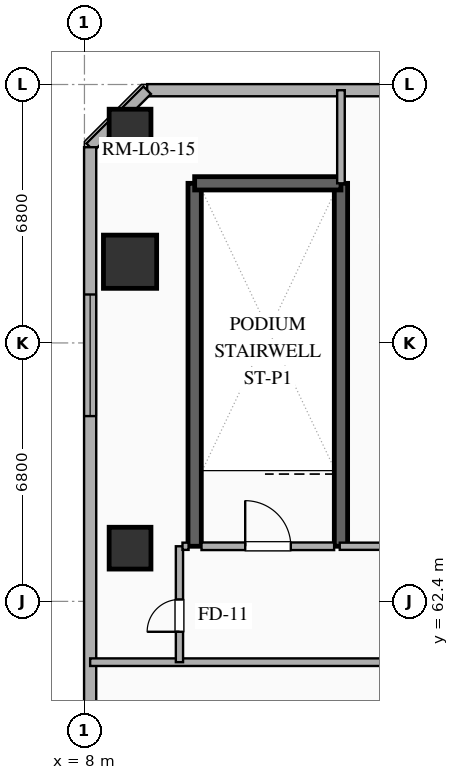
"""IFC4 building model, lengths in metres.
Left out: names, types, materials, properties, quantities, classifications, styles, units other than length and angle.
Written with IfcOpenShell. Run it as: python <this file> out.ifc"""

import sys

from ifc_helpers import new_model, si_unit, direction, frame, frame_2d, origin, origin_2d, place, context, subcontext, project, spatial, rectangle, extrude, element, fill, save


model = new_model("IFC4")
c1 = context("Model", 3, precision=1e-05, world=origin(), true_north=direction((0.0, 1.0)))
c2 = subcontext(c1, "Body", "Model", "MODEL_VIEW")
j1 = project(units=[si_unit("LENGTHUNIT", "METRE"), si_unit("PLANEANGLEUNIT", "RADIAN")], contexts=[c1])
p1 = place(None, origin())
s1 = spatial("IfcSite", under=j1, at=p1, CompositionType="ELEMENT")
p2 = place(p1, origin())
s2 = spatial("IfcBuilding", under=s1, at=p2, CompositionType="ELEMENT")
p3 = place(p2, frame((0.0, 0.0, 16.8)))
s3 = spatial("IfcBuildingStorey", under=s2, at=p3, CompositionType="ELEMENT", Elevation=16.8)
for number, where, z_axis, x_axis in (
    (1, (9.2, 74.8, 0.0), (0.0, 0.0, 1.0), (1.0, 0.0, 0.0)),
    (2, (9.2, 63.8, 0.0), (0.0, 0.0, 1.0), (1.0, 0.0, 0.0)),
):
    element("IfcColumn", number, at=place(p3, frame(where, z_axis=z_axis, x_axis=x_axis)), inside=s3, PredefinedType="COLUMN", context=c2, shape_type="SweptSolid", body=[
        extrude(rectangle(XDim=1.1, YDim=1.1, at=origin_2d()), origin(), (0.0, 0.0, 1.0), 5.05),
    ])
p4 = place(p3, frame((9.2, 71.337, 0.0), z_axis=(0.0, 0.0, 1.0), x_axis=(1.0, 0.0, 0.0)))
e3 = element("IfcColumn", 3, at=p4, inside=s3, PredefinedType="COLUMN", context=c2, shape_type="SweptSolid", body=[
    extrude(rectangle(XDim=1.4, YDim=1.4, at=origin_2d()), origin(), (0.0, 0.0, 1.0), 5.05),
])
for number, where, z_axis, x_axis in (
    (4, (10.9, 63.85, 0.0), (0.0, 0.0, 1.0), (0.0, 1.0, 0.0)),
    (5, (14.75, 63.85, 0.0), (0.0, 0.0, 1.0), (0.0, 1.0, 0.0)),
):
    element("IfcWall", number, at=place(p3, frame(where, z_axis=z_axis, x_axis=x_axis)), inside=s3, PredefinedType="SHEAR", context=c2, shape_type="SweptSolid", body=[
        extrude(rectangle(XDim=9.55, YDim=0.35, at=frame_2d((4.775, 0.0))), origin(), (0.0, 0.0, 1.0), 5.05),
    ])
p5 = place(p3, frame((10.9, 73.4, 0.0), z_axis=(0.0, 0.0, 1.0), x_axis=(1.0, 0.0, 0.0)))
e6 = element("IfcWall", 6, at=p5, inside=s3, PredefinedType="SHEAR", context=c2, shape_type="SweptSolid", body=[
    extrude(rectangle(XDim=3.85, YDim=0.35, at=frame_2d((1.925, 0.0))), origin(), (0.0, 0.0, 1.0), 5.05),
])
p6 = place(p3, frame((86.35, 75.85, 0.0), z_axis=(0.0, 0.0, 1.0), x_axis=(-1.0, 0.0, 0.0)))
e7 = element("IfcWall", 7, at=p6, inside=s3, PredefinedType="SOLIDWALL", context=c2, shape_type="SweptSolid", body=[
    extrude(rectangle(XDim=76.7, YDim=0.32, at=frame_2d((38.35, 0.0))), origin(), (0.0, 0.0, 1.0), 5.05),
])
p7 = place(p6, frame((13.75, 0.0, 0.9)))
e8 = element("IfcOpeningElement", 8, at=p7, cuts=e7, PredefinedType="OPENING", context=c2, shape_type="SweptSolid", body=[
    extrude(rectangle(XDim=3.2, YDim=3.95, at=frame_2d((1.6, 1.975))), frame((0.0, 0.17, 0.0), z_axis=(0.0, -1.0, 0.0), x_axis=(1.0, 0.0, 0.0)), (0.0, 0.0, 1.0), 0.34),
])
p8 = place(p6, frame((24.75, 0.0, 0.9)))
e9 = element("IfcOpeningElement", 9, at=p8, cuts=e7, PredefinedType="OPENING", context=c2, shape_type="SweptSolid", body=[
    extrude(rectangle(XDim=3.2, YDim=3.95, at=frame_2d((1.6, 1.975))), frame((0.0, 0.17, 0.0), z_axis=(0.0, -1.0, 0.0), x_axis=(1.0, 0.0, 0.0)), (0.0, 0.0, 1.0), 0.34),
])
p9 = place(p6, frame((36.875, 0.0, 0.9)))
e10 = element("IfcOpeningElement", 10, at=p9, cuts=e7, PredefinedType="OPENING", context=c2, shape_type="SweptSolid", body=[
    extrude(rectangle(XDim=3.2, YDim=3.95, at=frame_2d((1.6, 1.975))), frame((0.0, 0.17, 0.0), z_axis=(0.0, -1.0, 0.0), x_axis=(1.0, 0.0, 0.0)), (0.0, 0.0, 1.0), 0.34),
])
p10 = place(p6, frame((48.75, 0.0, 0.9)))
e11 = element("IfcOpeningElement", 11, at=p10, cuts=e7, PredefinedType="OPENING", context=c2, shape_type="SweptSolid", body=[
    extrude(rectangle(XDim=3.2, YDim=3.95, at=frame_2d((1.6, 1.975))), frame((0.0, 0.17, 0.0), z_axis=(0.0, -1.0, 0.0), x_axis=(1.0, 0.0, 0.0)), (0.0, 0.0, 1.0), 0.34),
])
p11 = place(p3, frame((9.65, 75.85, 0.0), z_axis=(0.0, 0.0, 1.0), x_axis=(-0.707106781187, -0.707106781187, 0.0)))
e12 = element("IfcWall", 12, at=p11, inside=s3, PredefinedType="SOLIDWALL", context=c2, shape_type="SweptSolid", body=[
    extrude(rectangle(XDim=2.121, YDim=0.28, at=frame_2d((1.061, 0.0))), origin(), (0.0, 0.0, 1.0), 5.05),
])
p12 = place(p3, frame((8.15, 74.35, 0.0), z_axis=(0.0, 0.0, 1.0), x_axis=(0.0, -1.0, 0.0)))
e13 = element("IfcWall", 13, at=p12, inside=s3, PredefinedType="SOLIDWALL", context=c2, shape_type="SweptSolid", body=[
    extrude(rectangle(XDim=64.7, YDim=0.32, at=frame_2d((32.35, 0.0))), origin(), (0.0, 0.0, 1.0), 5.05),
])
p13 = place(p12, frame((3.875, 0.0, 0.9)))
e14 = element("IfcOpeningElement", 14, at=p13, cuts=e13, PredefinedType="OPENING", context=c2, shape_type="SweptSolid", body=[
    extrude(rectangle(XDim=3.2, YDim=3.95, at=frame_2d((1.6, 1.975))), frame((0.0, 0.17, 0.0), z_axis=(0.0, -1.0, 0.0), x_axis=(1.0, 0.0, 0.0)), (0.0, 0.0, 1.0), 0.34),
])
p14 = place(p12, frame((17.325, 0.0, 0.9)))
e15 = element("IfcOpeningElement", 15, at=p14, cuts=e13, PredefinedType="OPENING", context=c2, shape_type="SweptSolid", body=[
    extrude(rectangle(XDim=3.2, YDim=3.95, at=frame_2d((1.6, 1.975))), frame((0.0, 0.17, 0.0), z_axis=(0.0, -1.0, 0.0), x_axis=(1.0, 0.0, 0.0)), (0.0, 0.0, 1.0), 0.34),
])
p15 = place(p12, frame((31.85, 0.0, 0.9)))
e16 = element("IfcOpeningElement", 16, at=p15, cuts=e13, PredefinedType="OPENING", context=c2, shape_type="SweptSolid", body=[
    extrude(rectangle(XDim=3.2, YDim=3.95, at=frame_2d((1.6, 1.975))), frame((0.0, 0.17, 0.0), z_axis=(0.0, -1.0, 0.0), x_axis=(1.0, 0.0, 0.0)), (0.0, 0.0, 1.0), 0.34),
])
p16 = place(p12, frame((47.75, 0.0, 0.9)))
e17 = element("IfcOpeningElement", 17, at=p16, cuts=e13, PredefinedType="OPENING", context=c2, shape_type="SweptSolid", body=[
    extrude(rectangle(XDim=3.2, YDim=3.95, at=frame_2d((1.6, 1.975))), frame((0.0, 0.17, 0.0), z_axis=(0.0, -1.0, 0.0), x_axis=(1.0, 0.0, 0.0)), (0.0, 0.0, 1.0), 0.34),
])
p17 = place(p3, frame((11.08, 63.85, 0.0), z_axis=(0.0, 0.0, 1.0), x_axis=(1.0, 0.0, 0.0)))
e18 = element("IfcWall", 18, at=p17, inside=s3, PredefinedType="SOLIDWALL", context=c2, shape_type="SweptSolid", body=[
    extrude(rectangle(XDim=3.49, YDim=0.2, at=frame_2d((1.745, 0.0))), origin(), (0.0, 0.0, 1.0), 3.65),
])
p18 = place(p17, frame((1.15, 0.0, 0.0)))
e19 = element("IfcOpeningElement", 19, at=p18, cuts=e18, PredefinedType="OPENING", context=c2, shape_type="SweptSolid", body=[
    extrude(rectangle(XDim=1.2, YDim=2.15, at=frame_2d((0.6, 1.075))), frame((0.0, 0.11, 0.0), z_axis=(0.0, -1.0, 0.0), x_axis=(1.0, 0.0, 0.0)), (0.0, 0.0, 1.0), 0.22),
])
p19 = place(p3, frame((8.15, 60.8, 0.0), z_axis=(0.0, 0.0, 1.0), x_axis=(1.0, 0.0, 0.0)))
e20 = element("IfcWall", 20, at=p19, inside=s3, PredefinedType="PARTITIONING", context=c2, shape_type="SweptSolid", body=[
    extrude(rectangle(XDim=21.85, YDim=0.2, at=frame_2d((10.925, 0.0))), origin(), (0.0, 0.0, 1.0), 3.65),
])
p20 = place(p19, frame((11.484, 0.0, 0.0)))
e21 = element("IfcOpeningElement", 21, at=p20, cuts=e20, PredefinedType="OPENING", context=c2, shape_type="SweptSolid", body=[
    extrude(rectangle(XDim=1.2, YDim=2.25, at=frame_2d((0.6, 1.125))), frame((0.0, 0.11, 0.0), z_axis=(0.0, -1.0, 0.0), x_axis=(1.0, 0.0, 0.0)), (0.0, 0.0, 1.0), 0.22),
])
p21 = place(p3, frame((14.718, 63.85, 0.0), z_axis=(0.0, 0.0, 1.0), x_axis=(1.0, 0.0, 0.0)))
e22 = element("IfcWall", 22, at=p21, inside=s3, PredefinedType="PARTITIONING", context=c2, shape_type="SweptSolid", body=[
    extrude(rectangle(XDim=6.714, YDim=0.19, at=frame_2d((3.357, 0.0))), origin(), (0.0, 0.0, 1.0), 3.65),
])
p22 = place(p21, frame((2.607, 0.0, 0.0)))
e23 = element("IfcOpeningElement", 23, at=p22, cuts=e22, PredefinedType="OPENING", context=c2, shape_type="SweptSolid", body=[
    extrude(rectangle(XDim=0.9, YDim=2.15, at=frame_2d((0.45, 1.075))), frame((0.0, 0.105, 0.0), z_axis=(0.0, -1.0, 0.0), x_axis=(1.0, 0.0, 0.0)), (0.0, 0.0, 1.0), 0.21),
])
p23 = place(p3, frame((10.5, 60.8, 0.0), z_axis=(0.0, 0.0, 1.0), x_axis=(0.0, 1.0, 0.0)))
e24 = element("IfcWall", 24, at=p23, inside=s3, PredefinedType="PARTITIONING", context=c2, shape_type="SweptSolid", body=[
    extrude(rectangle(XDim=3.05, YDim=0.19, at=frame_2d((1.525, 0.0))), origin(), (0.0, 0.0, 1.0), 3.65),
])
p24 = place(p23, frame((0.8, 0.0, 0.0)))
e25 = element("IfcOpeningElement", 25, at=p24, cuts=e24, PredefinedType="OPENING", context=c2, shape_type="SweptSolid", body=[
    extrude(rectangle(XDim=0.85, YDim=2.15, at=frame_2d((0.425, 1.075))), frame((0.0, 0.105, 0.0), z_axis=(0.0, -1.0, 0.0), x_axis=(1.0, 0.0, 0.0)), (0.0, 0.0, 1.0), 0.21),
])
p25 = place(p3, frame((14.75, 75.85, 0.0), z_axis=(0.0, 0.0, 1.0), x_axis=(0.0, -1.0, 0.0)))
e26 = element("IfcWall", 26, at=p25, inside=s3, PredefinedType="PARTITIONING", context=c2, shape_type="SweptSolid", body=[
    extrude(rectangle(XDim=2.45, YDim=0.2, at=frame_2d((1.225, 0.0))), origin(), (0.0, 0.0, 1.0), 3.65),
])
p26 = place(p3, frame((10.58, 63.85, 0.0), z_axis=(0.0, 0.0, 1.0), x_axis=(1.0, 0.0, 0.0)))
e27 = element("IfcWall", 27, at=p26, inside=s3, PredefinedType="PARTITIONING", context=c2, shape_type="SweptSolid", body=[
    extrude(rectangle(XDim=0.16, YDim=0.19, at=frame_2d((0.08, 0.0))), origin(), (0.0, 0.0, 1.0), 3.65),
])
p27 = place(p13, origin())
e28 = element("IfcWindow", 28, at=p27, inside=s3, PartitioningType="SINGLE_PANEL", PredefinedType="WINDOW", context=c2, shape_type="SweptSolid", body=[
    extrude(rectangle(XDim=3.2, YDim=3.95, at=frame_2d((1.6, 1.975))), frame((0.0, 0.03, 0.0), z_axis=(0.0, -1.0, 0.0), x_axis=(1.0, 0.0, 0.0)), (0.0, 0.0, 1.0), 0.06),
])
fill(e14, e28)
p28 = place(p18, origin())
e29 = element("IfcDoor", 29, at=p28, inside=s3, OperationType="SINGLE_SWING_LEFT", PredefinedType="DOOR", context=c2, shape_type="SweptSolid", body=[
    extrude(rectangle(XDim=1.2, YDim=2.15, at=frame_2d((0.6, 1.075))), frame((0.0, 0.025, 0.0), z_axis=(0.0, -1.0, 0.0), x_axis=(1.0, 0.0, 0.0)), (0.0, 0.0, 1.0), 0.05),
])
fill(e19, e29)
p29 = place(p24, origin())
e30 = element("IfcDoor", 30, at=p29, inside=s3, OperationType="SINGLE_SWING_LEFT", PredefinedType="DOOR", context=c2, shape_type="SweptSolid", body=[
    extrude(rectangle(XDim=0.85, YDim=2.15, at=frame_2d((0.425, 1.075))), frame((0.0, 0.025, 0.0), z_axis=(0.0, -1.0, 0.0), x_axis=(1.0, 0.0, 0.0)), (0.0, 0.0, 1.0), 0.05),
])
fill(e25, e30)
save(model, sys.argv[1])
